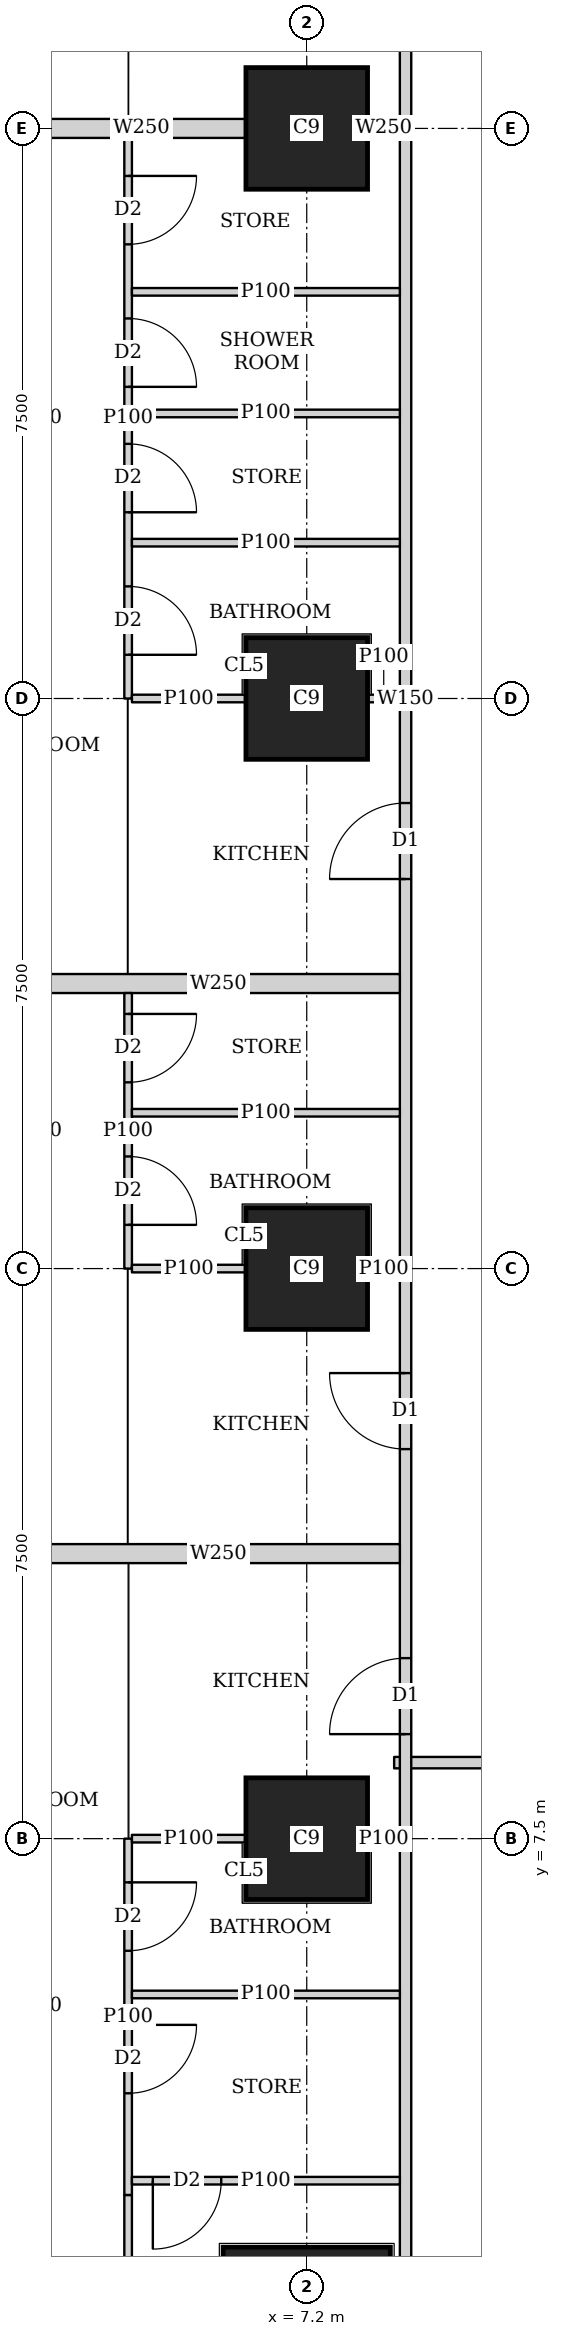
"""IFC4 building model, lengths in metres.
Left out: names, types, materials, properties, quantities, classifications, styles, units other than length and angle.
Written with IfcOpenShell. Run it as: python <this file> out.ifc"""

import sys

from ifc_helpers import new_model, si_unit, direction, frame, frame_2d, origin, origin_2d, place, context, subcontext, project, spatial, rectangle, extrude, element, fill, save


model = new_model("IFC4")
c1 = context("Model", 3, precision=1e-05, world=origin(), true_north=direction((0.0, 1.0)))
c2 = subcontext(c1, "Body", "Model", "MODEL_VIEW")
j1 = project(units=[si_unit("LENGTHUNIT", "METRE"), si_unit("PLANEANGLEUNIT", "RADIAN")], contexts=[c1])
p1 = place(None, origin())
s1 = spatial("IfcSite", under=j1, at=p1, CompositionType="ELEMENT")
p2 = place(p1, origin())
s2 = spatial("IfcBuilding", under=s1, at=p2, CompositionType="ELEMENT")
p3 = place(p2, frame((0.0, 0.0, 89.15)))
s3 = spatial("IfcBuildingStorey", under=s2, at=p3, CompositionType="ELEMENT", Elevation=89.15)
p4 = place(p3, frame((7.2, 1.025, 0.0), z_axis=(0.0, 0.0, 1.0), x_axis=(1.0, 0.0, 0.0)))
e1 = element("IfcColumn", 1, at=p4, inside=s3, PredefinedType="COLUMN", context=c2, shape_type="SweptSolid", body=[
    extrude(rectangle(XDim=2.2, YDim=2.2, at=origin_2d()), origin(), (0.0, 0.0, 1.0), 3.75),
])
for number, where, z_axis, x_axis in (
    (2, (7.2, 7.5, 0.0), (0.0, 0.0, 1.0), (1.0, 0.0, 0.0)),
    (3, (7.2, 15.0, 0.0), (0.0, 0.0, 1.0), (1.0, 0.0, 0.0)),
    (4, (7.2, 22.5, 0.0), (0.0, 0.0, 1.0), (1.0, 0.0, 0.0)),
    (5, (7.2, 30.0, 0.0), (0.0, 0.0, 1.0), (1.0, 0.0, 0.0)),
):
    element("IfcColumn", number, at=place(p3, frame(where, z_axis=z_axis, x_axis=x_axis)), inside=s3, PredefinedType="COLUMN", context=c2, shape_type="SweptSolid", body=[
        extrude(rectangle(XDim=1.6, YDim=1.6, at=origin_2d()), origin(), (0.0, 0.0, 1.0), 3.75),
    ])
p5 = place(p3, frame((8.5, -0.65, 0.0), z_axis=(0.0, 0.0, 1.0), x_axis=(0.0, 1.0, 0.0)))
e6 = element("IfcWall", 6, at=p5, inside=s3, PredefinedType="SOLIDWALL", context=c2, shape_type="SweptSolid", body=[
    extrude(rectangle(XDim=46.3, YDim=0.15, at=frame_2d((23.15, 0.0))), origin(), (0.0, 0.0, 1.0), 2.2),
])
p6 = place(p5, frame((9.525, 0.0, 0.0)))
e7 = element("IfcOpeningElement", 7, at=p6, cuts=e6, PredefinedType="OPENING", context=c2, shape_type="SweptSolid", body=[
    extrude(rectangle(XDim=1.0, YDim=2.1, at=frame_2d((0.5, 1.05))), frame((0.0, 0.085, 0.0), z_axis=(0.0, -1.0, 0.0), x_axis=(1.0, 0.0, 0.0)), (0.0, 0.0, 1.0), 0.17),
])
p7 = place(p5, frame((13.275, 0.0, 0.0)))
e8 = element("IfcOpeningElement", 8, at=p7, cuts=e6, PredefinedType="OPENING", context=c2, shape_type="SweptSolid", body=[
    extrude(rectangle(XDim=1.0, YDim=2.1, at=frame_2d((0.5, 1.05))), frame((0.0, 0.085, 0.0), z_axis=(0.0, -1.0, 0.0), x_axis=(1.0, 0.0, 0.0)), (0.0, 0.0, 1.0), 0.17),
])
p8 = place(p5, frame((20.775, 0.0, 0.0)))
e9 = element("IfcOpeningElement", 9, at=p8, cuts=e6, PredefinedType="OPENING", context=c2, shape_type="SweptSolid", body=[
    extrude(rectangle(XDim=1.0, YDim=2.1, at=frame_2d((0.5, 1.05))), frame((0.0, 0.085, 0.0), z_axis=(0.0, -1.0, 0.0), x_axis=(1.0, 0.0, 0.0)), (0.0, 0.0, 1.0), 0.17),
])
p9 = place(p5, frame((32.025, 0.0, 0.0)))
e10 = element("IfcOpeningElement", 10, at=p9, cuts=e6, PredefinedType="OPENING", context=c2, shape_type="SweptSolid", body=[
    extrude(rectangle(XDim=1.0, YDim=2.1, at=frame_2d((0.5, 1.05))), frame((0.0, 0.085, 0.0), z_axis=(0.0, -1.0, 0.0), x_axis=(1.0, 0.0, 0.0)), (0.0, 0.0, 1.0), 0.17),
])
p10 = place(p3, frame((40.053, 8.5, 0.0), z_axis=(0.0, 0.0, 1.0), x_axis=(-1.0, 0.0, 0.0)))
e11 = element("IfcWall", 11, at=p10, inside=s3, PredefinedType="SOLIDWALL", context=c2, shape_type="SweptSolid", body=[
    extrude(rectangle(XDim=31.703, YDim=0.15, at=frame_2d((15.852, 0.0))), origin(), (0.0, 0.0, 1.0), 3.5),
])
p11 = place(p10, frame((28.103, 0.0, 0.0)))
e12 = element("IfcOpeningElement", 12, at=p11, cuts=e11, PredefinedType="OPENING", context=c2, shape_type="SweptSolid", body=[
    extrude(rectangle(XDim=1.0, YDim=2.1, at=frame_2d((0.5, 1.05))), frame((0.0, 0.085, 0.0), z_axis=(0.0, -1.0, 0.0), x_axis=(1.0, 0.0, 0.0)), (0.0, 0.0, 1.0), 0.17),
])
p12 = place(p10, frame((19.953, 0.0, 0.0)))
e13 = element("IfcOpeningElement", 13, at=p12, cuts=e11, PredefinedType="OPENING", context=c2, shape_type="SweptSolid", body=[
    extrude(rectangle(XDim=1.0, YDim=2.1, at=frame_2d((0.5, 1.05))), frame((0.0, 0.085, 0.0), z_axis=(0.0, -1.0, 0.0), x_axis=(1.0, 0.0, 0.0)), (0.0, 0.0, 1.0), 0.17),
])
p13 = place(p10, frame((12.753, 0.0, 0.0)))
e14 = element("IfcOpeningElement", 14, at=p13, cuts=e11, PredefinedType="OPENING", context=c2, shape_type="SweptSolid", body=[
    extrude(rectangle(XDim=1.0, YDim=2.1, at=frame_2d((0.5, 1.05))), frame((0.0, 0.085, 0.0), z_axis=(0.0, -1.0, 0.0), x_axis=(1.0, 0.0, 0.0)), (0.0, 0.0, 1.0), 0.17),
])
p14 = place(p10, frame((0.15, 0.0, 0.0)))
e15 = element("IfcOpeningElement", 15, at=p14, cuts=e11, PredefinedType="OPENING", context=c2, shape_type="SweptSolid", body=[
    extrude(rectangle(XDim=1.0, YDim=2.1, at=frame_2d((0.5, 1.05))), frame((0.0, 0.085, 0.0), z_axis=(0.0, -1.0, 0.0), x_axis=(1.0, 0.0, 0.0)), (0.0, 0.0, 1.0), 0.17),
])
p15 = place(p3, frame((4.85, 0.326, 0.0), z_axis=(0.0, 0.0, 1.0), x_axis=(0.0, 1.0, 0.0)))
e16 = element("IfcWall", 16, at=p15, inside=s3, PredefinedType="PARTITIONING", context=c2, shape_type="SweptSolid", body=[
    extrude(rectangle(XDim=2.486, YDim=0.1, at=frame_2d((1.243, 0.0))), origin(), (0.0, 0.0, 1.0), 2.05),
])
p16 = place(p3, frame((4.85, 2.812, 0.0), z_axis=(0.0, 0.0, 1.0), x_axis=(0.0, 1.0, 0.0)))
e17 = element("IfcWall", 17, at=p16, inside=s3, PredefinedType="PARTITIONING", context=c2, shape_type="SweptSolid", body=[
    extrude(rectangle(XDim=4.688, YDim=0.1, at=frame_2d((2.344, 0.0))), origin(), (0.0, 0.0, 1.0), 3.5),
])
p17 = place(p16, frame((3.213, 0.0, 0.0)))
e18 = element("IfcOpeningElement", 18, at=p17, cuts=e17, PredefinedType="OPENING", context=c2, shape_type="SweptSolid", body=[
    extrude(rectangle(XDim=0.9, YDim=2.1, at=frame_2d((0.45, 1.05))), frame((0.0, 0.06, 0.0), z_axis=(0.0, -1.0, 0.0), x_axis=(1.0, 0.0, 0.0)), (0.0, 0.0, 1.0), 0.12),
])
p18 = place(p16, frame((1.338, 0.0, 0.0)))
e19 = element("IfcOpeningElement", 19, at=p18, cuts=e17, PredefinedType="OPENING", context=c2, shape_type="SweptSolid", body=[
    extrude(rectangle(XDim=0.9, YDim=2.1, at=frame_2d((0.45, 1.05))), frame((0.0, 0.06, 0.0), z_axis=(0.0, -1.0, 0.0), x_axis=(1.0, 0.0, 0.0)), (0.0, 0.0, 1.0), 0.12),
])
p19 = place(p3, frame((4.9, 7.5, 0.0), z_axis=(0.0, 0.0, 1.0), x_axis=(1.0, 0.0, 0.0)))
e20 = element("IfcWall", 20, at=p19, inside=s3, PredefinedType="PARTITIONING", context=c2, shape_type="SweptSolid", body=[
    extrude(rectangle(XDim=1.499, YDim=0.1, at=frame_2d((0.75, 0.0))), origin(), (0.0, 0.0, 1.0), 3.5),
])
p20 = place(p3, frame((8.001, 7.5, 0.0), z_axis=(0.0, 0.0, 1.0), x_axis=(1.0, 0.0, 0.0)))
e21 = element("IfcWall", 21, at=p20, inside=s3, PredefinedType="PARTITIONING", context=c2, shape_type="SweptSolid", body=[
    extrude(rectangle(XDim=0.424, YDim=0.1, at=frame_2d((0.212, 0.0))), origin(), (0.0, 0.0, 1.0), 3.5),
])
p21 = place(p3, frame((4.9, 5.45, 0.0), z_axis=(0.0, 0.0, 1.0), x_axis=(1.0, 0.0, 0.0)))
e22 = element("IfcWall", 22, at=p21, inside=s3, PredefinedType="PARTITIONING", context=c2, shape_type="SweptSolid", body=[
    extrude(rectangle(XDim=3.525, YDim=0.1, at=frame_2d((1.763, 0.0))), origin(), (0.0, 0.0, 1.0), 3.5),
])
p22 = place(p3, frame((4.85, 15.0, 0.0), z_axis=(0.0, 0.0, 1.0), x_axis=(0.0, 1.0, 0.0)))
e23 = element("IfcWall", 23, at=p22, inside=s3, PredefinedType="PARTITIONING", context=c2, shape_type="SweptSolid", body=[
    extrude(rectangle(XDim=3.625, YDim=0.1, at=frame_2d((1.812, 0.0))), origin(), (0.0, 0.0, 1.0), 3.5),
])
p23 = place(p22, frame((0.575, 0.0, 0.0)))
e24 = element("IfcOpeningElement", 24, at=p23, cuts=e23, PredefinedType="OPENING", context=c2, shape_type="SweptSolid", body=[
    extrude(rectangle(XDim=0.9, YDim=2.1, at=frame_2d((0.45, 1.05))), frame((0.0, 0.06, 0.0), z_axis=(0.0, -1.0, 0.0), x_axis=(1.0, 0.0, 0.0)), (0.0, 0.0, 1.0), 0.12),
])
p24 = place(p22, frame((2.45, 0.0, 0.0)))
e25 = element("IfcOpeningElement", 25, at=p24, cuts=e23, PredefinedType="OPENING", context=c2, shape_type="SweptSolid", body=[
    extrude(rectangle(XDim=0.9, YDim=2.1, at=frame_2d((0.45, 1.05))), frame((0.0, 0.06, 0.0), z_axis=(0.0, -1.0, 0.0), x_axis=(1.0, 0.0, 0.0)), (0.0, 0.0, 1.0), 0.12),
])
p25 = place(p3, frame((4.9, 15.0, 0.0), z_axis=(0.0, 0.0, 1.0), x_axis=(1.0, 0.0, 0.0)))
e26 = element("IfcWall", 26, at=p25, inside=s3, PredefinedType="PARTITIONING", context=c2, shape_type="SweptSolid", body=[
    extrude(rectangle(XDim=1.499, YDim=0.1, at=frame_2d((0.75, 0.0))), origin(), (0.0, 0.0, 1.0), 3.5),
])
p26 = place(p3, frame((8.001, 15.0, 0.0), z_axis=(0.0, 0.0, 1.0), x_axis=(1.0, 0.0, 0.0)))
e27 = element("IfcWall", 27, at=p26, inside=s3, PredefinedType="PARTITIONING", context=c2, shape_type="SweptSolid", body=[
    extrude(rectangle(XDim=0.424, YDim=0.1, at=frame_2d((0.212, 0.0))), origin(), (0.0, 0.0, 1.0), 3.5),
])
p27 = place(p3, frame((4.9, 17.05, 0.0), z_axis=(0.0, 0.0, 1.0), x_axis=(1.0, 0.0, 0.0)))
e28 = element("IfcWall", 28, at=p27, inside=s3, PredefinedType="PARTITIONING", context=c2, shape_type="SweptSolid", body=[
    extrude(rectangle(XDim=3.525, YDim=0.1, at=frame_2d((1.763, 0.0))), origin(), (0.0, 0.0, 1.0), 3.5),
])
p28 = place(p3, frame((3.65, 11.25, 0.0), z_axis=(0.0, 0.0, 1.0), x_axis=(1.0, 0.0, 0.0)))
e29 = element("IfcWall", 29, at=p28, inside=s3, PredefinedType="SOLIDWALL", context=c2, shape_type="SweptSolid", body=[
    extrude(rectangle(XDim=4.775, YDim=0.25, at=frame_2d((2.388, 0.0))), origin(), (0.0, 0.0, 1.0), 3.5),
])
p29 = place(p3, frame((4.85, 22.5, 0.0), z_axis=(0.0, 0.0, 1.0), x_axis=(0.0, 1.0, 0.0)))
e30 = element("IfcWall", 30, at=p29, inside=s3, PredefinedType="PARTITIONING", context=c2, shape_type="SweptSolid", body=[
    extrude(rectangle(XDim=7.375, YDim=0.1, at=frame_2d((3.688, 0.0))), origin(), (0.0, 0.0, 1.0), 3.5),
])
p30 = place(p29, frame((0.575, 0.0, 0.0)))
e31 = element("IfcOpeningElement", 31, at=p30, cuts=e30, PredefinedType="OPENING", context=c2, shape_type="SweptSolid", body=[
    extrude(rectangle(XDim=0.9, YDim=2.1, at=frame_2d((0.45, 1.05))), frame((0.0, 0.06, 0.0), z_axis=(0.0, -1.0, 0.0), x_axis=(1.0, 0.0, 0.0)), (0.0, 0.0, 1.0), 0.12),
])
p31 = place(p29, frame((4.1, 0.0, 0.0)))
e32 = element("IfcOpeningElement", 32, at=p31, cuts=e30, PredefinedType="OPENING", context=c2, shape_type="SweptSolid", body=[
    extrude(rectangle(XDim=0.9, YDim=2.1, at=frame_2d((0.45, 1.05))), frame((0.0, 0.06, 0.0), z_axis=(0.0, -1.0, 0.0), x_axis=(1.0, 0.0, 0.0)), (0.0, 0.0, 1.0), 0.12),
])
p32 = place(p29, frame((2.45, 0.0, 0.0)))
e33 = element("IfcOpeningElement", 33, at=p32, cuts=e30, PredefinedType="OPENING", context=c2, shape_type="SweptSolid", body=[
    extrude(rectangle(XDim=0.9, YDim=2.1, at=frame_2d((0.45, 1.05))), frame((0.0, 0.06, 0.0), z_axis=(0.0, -1.0, 0.0), x_axis=(1.0, 0.0, 0.0)), (0.0, 0.0, 1.0), 0.12),
])
p33 = place(p29, frame((5.975, 0.0, 0.0)))
e34 = element("IfcOpeningElement", 34, at=p33, cuts=e30, PredefinedType="OPENING", context=c2, shape_type="SweptSolid", body=[
    extrude(rectangle(XDim=0.9, YDim=2.1, at=frame_2d((0.45, 1.05))), frame((0.0, 0.06, 0.0), z_axis=(0.0, -1.0, 0.0), x_axis=(1.0, 0.0, 0.0)), (0.0, 0.0, 1.0), 0.12),
])
p34 = place(p3, frame((4.9, 22.5, 0.0), z_axis=(0.0, 0.0, 1.0), x_axis=(1.0, 0.0, 0.0)))
e35 = element("IfcWall", 35, at=p34, inside=s3, PredefinedType="PARTITIONING", context=c2, shape_type="SweptSolid", body=[
    extrude(rectangle(XDim=1.499, YDim=0.1, at=frame_2d((0.75, 0.0))), origin(), (0.0, 0.0, 1.0), 3.5),
])
p35 = place(p3, frame((8.001, 22.5, 0.0), z_axis=(0.0, 0.0, 1.0), x_axis=(1.0, 0.0, 0.0)))
e36 = element("IfcWall", 36, at=p35, inside=s3, PredefinedType="PARTITIONING", context=c2, shape_type="SweptSolid", body=[
    extrude(rectangle(XDim=0.424, YDim=0.1, at=frame_2d((0.212, 0.0))), origin(), (0.0, 0.0, 1.0), 3.5),
])
for number, where, z_axis, x_axis in (
    (37, (4.9, 26.25, 0.0), (0.0, 0.0, 1.0), (1.0, 0.0, 0.0)),
    (38, (4.9, 24.55, 0.0), (0.0, 0.0, 1.0), (1.0, 0.0, 0.0)),
    (39, (4.9, 27.85, 0.0), (0.0, 0.0, 1.0), (1.0, 0.0, 0.0)),
):
    element("IfcWall", number, at=place(p3, frame(where, z_axis=z_axis, x_axis=x_axis)), inside=s3, PredefinedType="PARTITIONING", context=c2, shape_type="SweptSolid", body=[
        extrude(rectangle(XDim=3.525, YDim=0.1, at=frame_2d((1.763, 0.0))), origin(), (0.0, 0.0, 1.0), 3.5),
    ])
p36 = place(p3, frame((3.65, 18.75, 0.0), z_axis=(0.0, 0.0, 1.0), x_axis=(1.0, 0.0, 0.0)))
e40 = element("IfcWall", 40, at=p36, inside=s3, PredefinedType="SOLIDWALL", context=c2, shape_type="SweptSolid", body=[
    extrude(rectangle(XDim=4.775, YDim=0.25, at=frame_2d((2.388, 0.0))), origin(), (0.0, 0.0, 1.0), 3.5),
])
p37 = place(p3, frame((3.65, 30.0, 0.0), z_axis=(0.0, 0.0, 1.0), x_axis=(1.0, 0.0, 0.0)))
e41 = element("IfcWall", 41, at=p37, inside=s3, PredefinedType="SOLIDWALL", context=c2, shape_type="SweptSolid", body=[
    extrude(rectangle(XDim=2.749, YDim=0.25, at=frame_2d((1.375, 0.0))), origin(), (0.0, 0.0, 1.0), 3.5),
])
p38 = place(p3, frame((8.001, 30.0, 0.0), z_axis=(0.0, 0.0, 1.0), x_axis=(1.0, 0.0, 0.0)))
e42 = element("IfcWall", 42, at=p38, inside=s3, PredefinedType="SOLIDWALL", context=c2, shape_type="SweptSolid", body=[
    extrude(rectangle(XDim=0.424, YDim=0.25, at=frame_2d((0.212, 0.0))), origin(), (0.0, 0.0, 1.0), 3.5),
])
p39 = place(p3, frame((8.425, 3.0, 0.0), z_axis=(0.0, 0.0, 1.0), x_axis=(-1.0, 0.0, 0.0)))
e43 = element("IfcWall", 43, at=p39, inside=s3, PredefinedType="PARTITIONING", context=c2, shape_type="SweptSolid", body=[
    extrude(rectangle(XDim=3.525, YDim=0.1, at=frame_2d((1.763, 0.0))), origin(), (0.0, 0.0, 1.0), 3.5),
])
p40 = place(p39, frame((2.35, 0.0, 0.0)))
e44 = element("IfcOpeningElement", 44, at=p40, cuts=e43, PredefinedType="OPENING", context=c2, shape_type="SweptSolid", body=[
    extrude(rectangle(XDim=0.9, YDim=2.1, at=frame_2d((0.45, 1.05))), frame((0.0, 0.06, 0.0), z_axis=(0.0, -1.0, 0.0), x_axis=(1.0, 0.0, 0.0)), (0.0, 0.0, 1.0), 0.12),
])
p41 = place(p17, origin())
e45 = element("IfcDoor", 45, at=p41, inside=s3, OperationType="SINGLE_SWING_LEFT", PredefinedType="DOOR", context=c2, shape_type="SweptSolid", body=[
    extrude(rectangle(XDim=0.9, YDim=2.1, at=frame_2d((0.45, 1.05))), frame((0.0, 0.025, 0.0), z_axis=(0.0, -1.0, 0.0), x_axis=(1.0, 0.0, 0.0)), (0.0, 0.0, 1.0), 0.05),
])
fill(e18, e45)
p42 = place(p18, origin())
e46 = element("IfcDoor", 46, at=p42, inside=s3, OperationType="SINGLE_SWING_LEFT", PredefinedType="DOOR", context=c2, shape_type="SweptSolid", body=[
    extrude(rectangle(XDim=0.9, YDim=2.1, at=frame_2d((0.45, 1.05))), frame((0.0, 0.025, 0.0), z_axis=(0.0, -1.0, 0.0), x_axis=(1.0, 0.0, 0.0)), (0.0, 0.0, 1.0), 0.05),
])
fill(e19, e46)
p43 = place(p6, origin())
e47 = element("IfcDoor", 47, at=p43, inside=s3, OperationType="SINGLE_SWING_LEFT", PredefinedType="DOOR", context=c2, shape_type="SweptSolid", body=[
    extrude(rectangle(XDim=1.0, YDim=2.1, at=frame_2d((0.5, 1.05))), frame((0.0, 0.025, 0.0), z_axis=(0.0, -1.0, 0.0), x_axis=(1.0, 0.0, 0.0)), (0.0, 0.0, 1.0), 0.05),
])
fill(e7, e47)
p44 = place(p23, origin())
e48 = element("IfcDoor", 48, at=p44, inside=s3, OperationType="SINGLE_SWING_RIGHT", PredefinedType="DOOR", context=c2, shape_type="SweptSolid", body=[
    extrude(rectangle(XDim=0.9, YDim=2.1, at=frame_2d((0.45, 1.05))), frame((0.0, 0.025, 0.0), z_axis=(0.0, -1.0, 0.0), x_axis=(1.0, 0.0, 0.0)), (0.0, 0.0, 1.0), 0.05),
])
fill(e24, e48)
p45 = place(p24, origin())
e49 = element("IfcDoor", 49, at=p45, inside=s3, OperationType="SINGLE_SWING_LEFT", PredefinedType="DOOR", context=c2, shape_type="SweptSolid", body=[
    extrude(rectangle(XDim=0.9, YDim=2.1, at=frame_2d((0.45, 1.05))), frame((0.0, 0.025, 0.0), z_axis=(0.0, -1.0, 0.0), x_axis=(1.0, 0.0, 0.0)), (0.0, 0.0, 1.0), 0.05),
])
fill(e25, e49)
p46 = place(p7, origin())
e50 = element("IfcDoor", 50, at=p46, inside=s3, OperationType="SINGLE_SWING_RIGHT", PredefinedType="DOOR", context=c2, shape_type="SweptSolid", body=[
    extrude(rectangle(XDim=1.0, YDim=2.1, at=frame_2d((0.5, 1.05))), frame((0.0, 0.025, 0.0), z_axis=(0.0, -1.0, 0.0), x_axis=(1.0, 0.0, 0.0)), (0.0, 0.0, 1.0), 0.05),
])
fill(e8, e50)
p47 = place(p30, origin())
e51 = element("IfcDoor", 51, at=p47, inside=s3, OperationType="SINGLE_SWING_RIGHT", PredefinedType="DOOR", context=c2, shape_type="SweptSolid", body=[
    extrude(rectangle(XDim=0.9, YDim=2.1, at=frame_2d((0.45, 1.05))), frame((0.0, 0.025, 0.0), z_axis=(0.0, -1.0, 0.0), x_axis=(1.0, 0.0, 0.0)), (0.0, 0.0, 1.0), 0.05),
])
fill(e31, e51)
p48 = place(p31, origin())
e52 = element("IfcDoor", 52, at=p48, inside=s3, OperationType="SINGLE_SWING_RIGHT", PredefinedType="DOOR", context=c2, shape_type="SweptSolid", body=[
    extrude(rectangle(XDim=0.9, YDim=2.1, at=frame_2d((0.45, 1.05))), frame((0.0, 0.025, 0.0), z_axis=(0.0, -1.0, 0.0), x_axis=(1.0, 0.0, 0.0)), (0.0, 0.0, 1.0), 0.05),
])
fill(e32, e52)
p49 = place(p32, origin())
e53 = element("IfcDoor", 53, at=p49, inside=s3, OperationType="SINGLE_SWING_RIGHT", PredefinedType="DOOR", context=c2, shape_type="SweptSolid", body=[
    extrude(rectangle(XDim=0.9, YDim=2.1, at=frame_2d((0.45, 1.05))), frame((0.0, 0.025, 0.0), z_axis=(0.0, -1.0, 0.0), x_axis=(1.0, 0.0, 0.0)), (0.0, 0.0, 1.0), 0.05),
])
fill(e33, e53)
p50 = place(p33, origin())
e54 = element("IfcDoor", 54, at=p50, inside=s3, OperationType="SINGLE_SWING_LEFT", PredefinedType="DOOR", context=c2, shape_type="SweptSolid", body=[
    extrude(rectangle(XDim=0.9, YDim=2.1, at=frame_2d((0.45, 1.05))), frame((0.0, 0.025, 0.0), z_axis=(0.0, -1.0, 0.0), x_axis=(1.0, 0.0, 0.0)), (0.0, 0.0, 1.0), 0.05),
])
fill(e34, e54)
p51 = place(p8, origin())
e55 = element("IfcDoor", 55, at=p51, inside=s3, OperationType="SINGLE_SWING_LEFT", PredefinedType="DOOR", context=c2, shape_type="SweptSolid", body=[
    extrude(rectangle(XDim=1.0, YDim=2.1, at=frame_2d((0.5, 1.05))), frame((0.0, 0.025, 0.0), z_axis=(0.0, -1.0, 0.0), x_axis=(1.0, 0.0, 0.0)), (0.0, 0.0, 1.0), 0.05),
])
fill(e9, e55)
p52 = place(p40, origin())
e56 = element("IfcDoor", 56, at=p52, inside=s3, OperationType="SINGLE_SWING_RIGHT", PredefinedType="DOOR", context=c2, shape_type="SweptSolid", body=[
    extrude(rectangle(XDim=0.9, YDim=2.1, at=frame_2d((0.45, 1.05))), frame((0.0, 0.025, 0.0), z_axis=(0.0, -1.0, 0.0), x_axis=(1.0, 0.0, 0.0)), (0.0, 0.0, 1.0), 0.05),
])
fill(e44, e56)
save(model, sys.argv[1])
